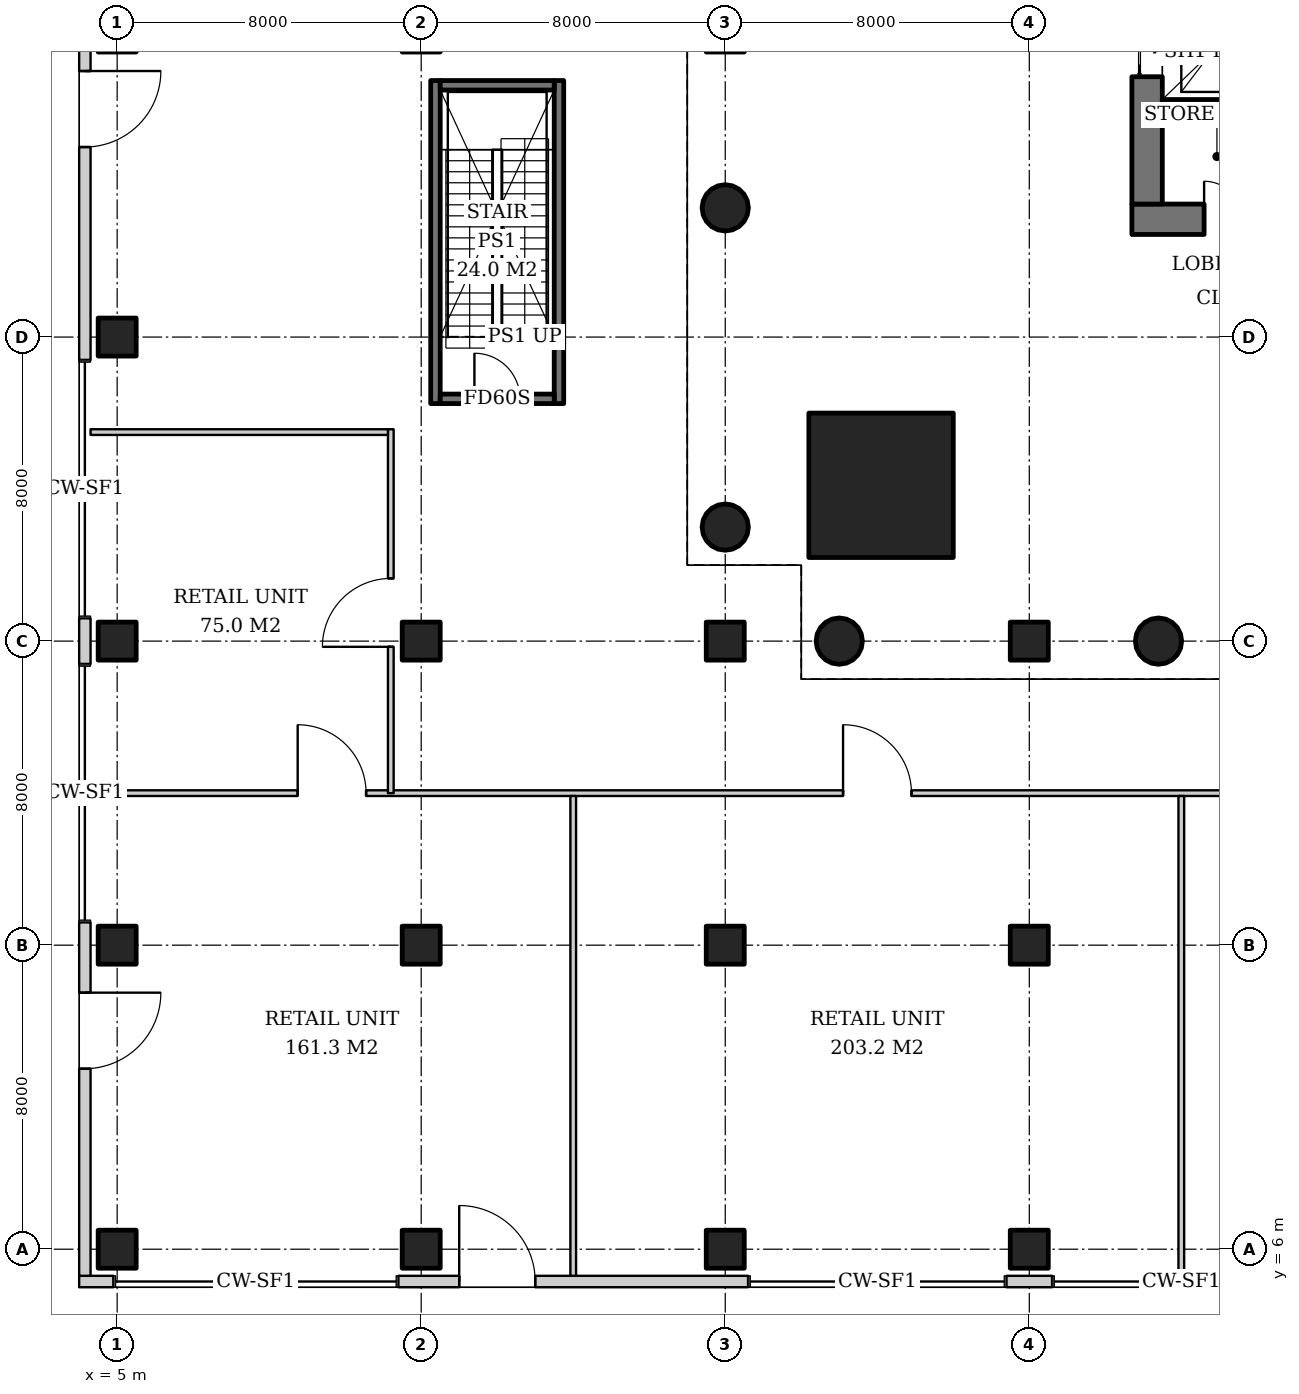
"""IFC4 building model, lengths in metres.
Left out: names, types, materials, properties, quantities, classifications, styles, units other than length and angle.
Written with IfcOpenShell. Run it as: python <this file> out.ifc"""

import sys

from ifc_helpers import new_model, si_unit, direction, frame, frame_2d, origin, origin_2d, place, context, subcontext, project, spatial, rectangle, hollow_circle, extrude, element, fill, save


model = new_model("IFC4")
c1 = context("Model", 3, precision=1e-05, world=origin(), true_north=direction((0.0, 1.0)))
c2 = subcontext(c1, "Body", "Model", "MODEL_VIEW")
j1 = project(units=[si_unit("LENGTHUNIT", "METRE"), si_unit("PLANEANGLEUNIT", "RADIAN")], contexts=[c1])
p1 = place(None, origin())
s1 = spatial("IfcSite", under=j1, at=p1, CompositionType="ELEMENT")
p2 = place(p1, origin())
s2 = spatial("IfcBuilding", under=s1, at=p2, CompositionType="ELEMENT")
p3 = place(p2, origin())
s3 = spatial("IfcBuildingStorey", under=s2, at=p3, CompositionType="ELEMENT", Elevation=0.0)
for number, where, z_axis, x_axis in (
    (1, (5.0, 6.0, 0.0), (0.0, 0.0, 1.0), (1.0, 0.0, 0.0)),
    (2, (5.0, 14.0, 0.0), (0.0, 0.0, 1.0), (1.0, 0.0, 0.0)),
    (3, (5.0, 22.0, 0.0), (0.0, 0.0, 1.0), (1.0, 0.0, 0.0)),
    (4, (5.0, 30.0, 0.0), (0.0, 0.0, 1.0), (1.0, 0.0, 0.0)),
    (5, (13.0, 6.0, 0.0), (0.0, 0.0, 1.0), (1.0, 0.0, 0.0)),
    (6, (13.0, 14.0, 0.0), (0.0, 0.0, 1.0), (1.0, 0.0, 0.0)),
    (7, (13.0, 22.0, 0.0), (0.0, 0.0, 1.0), (1.0, 0.0, 0.0)),
    (8, (21.0, 6.0, 0.0), (0.0, 0.0, 1.0), (1.0, 0.0, 0.0)),
    (9, (21.0, 14.0, 0.0), (0.0, 0.0, 1.0), (1.0, 0.0, 0.0)),
    (10, (29.0, 6.0, 0.0), (0.0, 0.0, 1.0), (1.0, 0.0, 0.0)),
    (11, (29.0, 14.0, 0.0), (0.0, 0.0, 1.0), (1.0, 0.0, 0.0)),
):
    element("IfcColumn", number, at=place(p3, frame(where, z_axis=z_axis, x_axis=x_axis)), inside=s3, PredefinedType="COLUMN", context=c2, shape_type="SweptSolid", body=[
        extrude(rectangle(XDim=1.0, YDim=1.0, at=origin_2d()), origin(), (0.0, 0.0, 1.0), 6.0),
    ])
p4 = place(p3, frame((25.1, 26.1, 0.0), z_axis=(0.0, 0.0, 1.0), x_axis=(1.0, 0.0, 0.0)))
e12 = element("IfcColumn", 12, at=p4, inside=s3, PredefinedType="COLUMN", context=c2, shape_type="SweptSolid", body=[
    extrude(rectangle(XDim=3.8, YDim=3.8, at=origin_2d()), origin(), (0.0, 0.0, 1.0), 6.0),
])
for number, where, z_axis, x_axis in (
    (13, (21.0, 25.0, 0.0), (0.0, 0.0, 1.0), (1.0, 0.0, 0.0)),
    (14, (21.0, 33.4, 0.0), (0.0, 0.0, 1.0), (1.0, 0.0, 0.0)),
    (15, (24.0, 22.0, 0.0), (0.0, 0.0, 1.0), (1.0, 0.0, 0.0)),
    (16, (32.4, 22.0, 0.0), (0.0, 0.0, 1.0), (1.0, 0.0, 0.0)),
):
    element("IfcColumn", number, at=place(p3, frame(where, z_axis=z_axis, x_axis=x_axis)), inside=s3, PredefinedType="COLUMN", context=c2, shape_type="SweptSolid", body=[
        extrude(hollow_circle(Radius=0.61, WallThickness=0.04, at=origin_2d()), origin(), (0.0, 0.0, 1.0), 6.0),
    ])
p5 = place(p3, frame((31.7, 33.1, 0.0), z_axis=(0.0, 0.0, 1.0), x_axis=(1.0, 0.0, 0.0)))
e17 = element("IfcWall", 17, at=p5, inside=s3, PredefinedType="SHEAR", context=c2, shape_type="SweptSolid", body=[
    extrude(rectangle(XDim=26.6, YDim=0.8, at=frame_2d((13.3, 0.0))), origin(), (0.0, 0.0, 1.0), 6.0),
])
p6 = place(p5, frame((7.3, 0.0, 0.0)))
e18 = element("IfcOpeningElement", 18, at=p6, cuts=e17, PredefinedType="OPENING", context=c2, shape_type="SweptSolid", body=[
    extrude(rectangle(XDim=1.0, YDim=2.1, at=frame_2d((0.5, 1.05))), frame((0.0, 0.41, 0.0), z_axis=(0.0, -1.0, 0.0), x_axis=(1.0, 0.0, 0.0)), (0.0, 0.0, 1.0), 0.82),
])
p7 = place(p5, frame((18.75, 0.0, 0.0)))
e19 = element("IfcOpeningElement", 19, at=p7, cuts=e17, PredefinedType="OPENING", context=c2, shape_type="SweptSolid", body=[
    extrude(rectangle(XDim=1.0, YDim=2.1, at=frame_2d((0.5, 1.05))), frame((0.0, 0.41, 0.0), z_axis=(0.0, -1.0, 0.0), x_axis=(1.0, 0.0, 0.0)), (0.0, 0.0, 1.0), 0.82),
])
p8 = place(p5, frame((1.9, 0.0, 0.0)))
e20 = element("IfcOpeningElement", 20, at=p8, cuts=e17, PredefinedType="OPENING", context=c2, shape_type="SweptSolid", body=[
    extrude(rectangle(XDim=1.0, YDim=2.1, at=frame_2d((0.5, 1.05))), frame((0.0, 0.41, 0.0), z_axis=(0.0, -1.0, 0.0), x_axis=(1.0, 0.0, 0.0)), (0.0, 0.0, 1.0), 0.82),
])
p9 = place(p5, frame((4.725, 0.0, 0.0)))
e21 = element("IfcOpeningElement", 21, at=p9, cuts=e17, PredefinedType="OPENING", context=c2, shape_type="SweptSolid", body=[
    extrude(rectangle(XDim=1.0, YDim=2.1, at=frame_2d((0.5, 1.05))), frame((0.0, 0.41, 0.0), z_axis=(0.0, -1.0, 0.0), x_axis=(1.0, 0.0, 0.0)), (0.0, 0.0, 1.0), 0.82),
])
p10 = place(p5, frame((12.44, 0.0, 0.0)))
e22 = element("IfcOpeningElement", 22, at=p10, cuts=e17, PredefinedType="OPENING", context=c2, shape_type="SweptSolid", body=[
    extrude(rectangle(XDim=1.0, YDim=2.1, at=frame_2d((0.5, 1.05))), frame((0.0, 0.41, 0.0), z_axis=(0.0, -1.0, 0.0), x_axis=(1.0, 0.0, 0.0)), (0.0, 0.0, 1.0), 0.82),
])
p11 = place(p5, frame((20.626, 0.0, 0.0)))
e23 = element("IfcOpeningElement", 23, at=p11, cuts=e17, PredefinedType="OPENING", context=c2, shape_type="SweptSolid", body=[
    extrude(rectangle(XDim=1.0, YDim=2.1, at=frame_2d((0.5, 1.05))), frame((0.0, 0.41, 0.0), z_axis=(0.0, -1.0, 0.0), x_axis=(1.0, 0.0, 0.0)), (0.0, 0.0, 1.0), 0.82),
])
p12 = place(p5, frame((23.476, 0.0, 0.0)))
e24 = element("IfcOpeningElement", 24, at=p12, cuts=e17, PredefinedType="OPENING", context=c2, shape_type="SweptSolid", body=[
    extrude(rectangle(XDim=1.0, YDim=2.1, at=frame_2d((0.5, 1.05))), frame((0.0, 0.41, 0.0), z_axis=(0.0, -1.0, 0.0), x_axis=(1.0, 0.0, 0.0)), (0.0, 0.0, 1.0), 0.82),
])
p13 = place(p3, frame((32.1, 33.5, 0.0), z_axis=(0.0, 0.0, 1.0), x_axis=(0.0, 1.0, 0.0)))
e25 = element("IfcWall", 25, at=p13, inside=s3, PredefinedType="SHEAR", context=c2, shape_type="SweptSolid", body=[
    extrude(rectangle(XDim=25.0, YDim=0.8, at=frame_2d((12.5, 0.0))), origin(), (0.0, 0.0, 1.0), 6.0),
])
p14 = place(p13, frame((3.35, 0.0, 0.0)))
e26 = element("IfcOpeningElement", 26, at=p14, cuts=e25, PredefinedType="OPENING", context=c2, shape_type="SweptSolid", body=[
    extrude(rectangle(XDim=1.3, YDim=2.2, at=frame_2d((0.65, 1.1))), frame((0.0, 0.41, 0.0), z_axis=(0.0, -1.0, 0.0), x_axis=(1.0, 0.0, 0.0)), (0.0, 0.0, 1.0), 0.82),
])
p15 = place(p13, frame((6.1, 0.0, 0.0)))
e27 = element("IfcOpeningElement", 27, at=p15, cuts=e25, PredefinedType="OPENING", context=c2, shape_type="SweptSolid", body=[
    extrude(rectangle(XDim=1.3, YDim=2.2, at=frame_2d((0.65, 1.1))), frame((0.0, 0.41, 0.0), z_axis=(0.0, -1.0, 0.0), x_axis=(1.0, 0.0, 0.0)), (0.0, 0.0, 1.0), 0.82),
])
p16 = place(p13, frame((8.85, 0.0, 0.0)))
e28 = element("IfcOpeningElement", 28, at=p16, cuts=e25, PredefinedType="OPENING", context=c2, shape_type="SweptSolid", body=[
    extrude(rectangle(XDim=1.3, YDim=2.2, at=frame_2d((0.65, 1.1))), frame((0.0, 0.41, 0.0), z_axis=(0.0, -1.0, 0.0), x_axis=(1.0, 0.0, 0.0)), (0.0, 0.0, 1.0), 0.82),
])
p17 = place(p13, frame((14.85, 0.0, 0.0)))
e29 = element("IfcOpeningElement", 29, at=p17, cuts=e25, PredefinedType="OPENING", context=c2, shape_type="SweptSolid", body=[
    extrude(rectangle(XDim=1.3, YDim=2.2, at=frame_2d((0.65, 1.1))), frame((0.0, 0.41, 0.0), z_axis=(0.0, -1.0, 0.0), x_axis=(1.0, 0.0, 0.0)), (0.0, 0.0, 1.0), 0.82),
])
p18 = place(p13, frame((17.6, 0.0, 0.0)))
e30 = element("IfcOpeningElement", 30, at=p18, cuts=e25, PredefinedType="OPENING", context=c2, shape_type="SweptSolid", body=[
    extrude(rectangle(XDim=1.3, YDim=2.2, at=frame_2d((0.65, 1.1))), frame((0.0, 0.41, 0.0), z_axis=(0.0, -1.0, 0.0), x_axis=(1.0, 0.0, 0.0)), (0.0, 0.0, 1.0), 0.82),
])
p19 = place(p13, frame((11.6, 0.0, 0.0)))
e31 = element("IfcOpeningElement", 31, at=p19, cuts=e25, PredefinedType="OPENING", context=c2, shape_type="SweptSolid", body=[
    extrude(rectangle(XDim=1.8, YDim=2.4, at=frame_2d((0.9, 1.2))), frame((0.0, 0.41, 0.0), z_axis=(0.0, -1.0, 0.0), x_axis=(1.0, 0.0, 0.0)), (0.0, 0.0, 1.0), 0.82),
])
for number, where, z_axis, x_axis in (
    (32, (21.0, 22.0, 0.0), (0.0, 0.0, 1.0), (1.0, 0.0, 0.0)),
    (33, (29.0, 22.0, 0.0), (0.0, 0.0, 1.0), (1.0, 0.0, 0.0)),
):
    element("IfcColumn", number, at=place(p3, frame(where, z_axis=z_axis, x_axis=x_axis)), inside=s3, PredefinedType="COLUMN", context=c2, shape_type="SweptSolid", body=[
        extrude(rectangle(XDim=1.0, YDim=1.0, at=origin_2d()), origin(), (0.0, 0.0, 1.0), 6.0),
    ])
p20 = place(p3, frame((4.0, 5.15, 0.0), z_axis=(0.0, 0.0, 1.0), x_axis=(1.0, 0.0, 0.0)))
e34 = element("IfcWall", 34, at=p20, inside=s3, PredefinedType="SOLIDWALL", context=c2, shape_type="SweptSolid", body=[
    extrude(rectangle(XDim=0.9, YDim=0.3, at=frame_2d((0.45, 0.0))), origin(), (0.0, 0.0, 1.0), 5.7),
])
p21 = place(p3, frame((12.4, 5.15, 0.0), z_axis=(0.0, 0.0, 1.0), x_axis=(1.0, 0.0, 0.0)))
e35 = element("IfcWall", 35, at=p21, inside=s3, PredefinedType="SOLIDWALL", context=c2, shape_type="SweptSolid", body=[
    extrude(rectangle(XDim=9.2, YDim=0.3, at=frame_2d((4.6, 0.0))), origin(), (0.0, 0.0, 1.0), 5.7),
])
p22 = place(p21, frame((1.6, 0.0, 0.0)))
e36 = element("IfcOpeningElement", 36, at=p22, cuts=e35, PredefinedType="OPENING", context=c2, shape_type="SweptSolid", body=[
    extrude(rectangle(XDim=2.0, YDim=2.7, at=frame_2d((1.0, 1.35))), frame((0.0, 0.16, 0.0), z_axis=(0.0, -1.0, 0.0), x_axis=(1.0, 0.0, 0.0)), (0.0, 0.0, 1.0), 0.32),
])
p23 = place(p3, frame((28.4, 5.15, 0.0), z_axis=(0.0, 0.0, 1.0), x_axis=(1.0, 0.0, 0.0)))
e37 = element("IfcWall", 37, at=p23, inside=s3, PredefinedType="SOLIDWALL", context=c2, shape_type="SweptSolid", body=[
    extrude(rectangle(XDim=1.2, YDim=0.3, at=frame_2d((0.6, 0.0))), origin(), (0.0, 0.0, 1.0), 5.7),
])
p24 = place(p3, frame((4.15, 38.6, 0.0), z_axis=(0.0, 0.0, 1.0), x_axis=(0.0, -1.0, 0.0)))
e38 = element("IfcWall", 38, at=p24, inside=s3, PredefinedType="SOLIDWALL", context=c2, shape_type="SweptSolid", body=[
    extrude(rectangle(XDim=9.2, YDim=0.3, at=frame_2d((4.6, 0.0))), origin(), (0.0, 0.0, 1.0), 5.7),
])
p25 = place(p24, frame((1.6, 0.0, 0.0)))
e39 = element("IfcOpeningElement", 39, at=p25, cuts=e38, PredefinedType="OPENING", context=c2, shape_type="SweptSolid", body=[
    extrude(rectangle(XDim=2.0, YDim=2.7, at=frame_2d((1.0, 1.35))), frame((0.0, 0.16, 0.0), z_axis=(0.0, -1.0, 0.0), x_axis=(1.0, 0.0, 0.0)), (0.0, 0.0, 1.0), 0.32),
])
p26 = place(p3, frame((4.15, 22.6, 0.0), z_axis=(0.0, 0.0, 1.0), x_axis=(0.0, -1.0, 0.0)))
e40 = element("IfcWall", 40, at=p26, inside=s3, PredefinedType="SOLIDWALL", context=c2, shape_type="SweptSolid", body=[
    extrude(rectangle(XDim=1.2, YDim=0.3, at=frame_2d((0.6, 0.0))), origin(), (0.0, 0.0, 1.0), 5.7),
])
p27 = place(p3, frame((4.15, 14.6, 0.0), z_axis=(0.0, 0.0, 1.0), x_axis=(0.0, -1.0, 0.0)))
e41 = element("IfcWall", 41, at=p27, inside=s3, PredefinedType="SOLIDWALL", context=c2, shape_type="SweptSolid", body=[
    extrude(rectangle(XDim=9.3, YDim=0.3, at=frame_2d((4.65, 0.0))), origin(), (0.0, 0.0, 1.0), 5.7),
])
p28 = place(p27, frame((1.85, 0.0, 0.0)))
e42 = element("IfcOpeningElement", 42, at=p28, cuts=e41, PredefinedType="OPENING", context=c2, shape_type="SweptSolid", body=[
    extrude(rectangle(XDim=2.0, YDim=2.7, at=frame_2d((1.0, 1.35))), frame((0.0, 0.16, 0.0), z_axis=(0.0, -1.0, 0.0), x_axis=(1.0, 0.0, 0.0)), (0.0, 0.0, 1.0), 0.32),
])
p29 = place(p3, frame((32.5, 36.125, 0.0), z_axis=(0.0, 0.0, 1.0), x_axis=(1.0, 0.0, 0.0)))
e43 = element("IfcWall", 43, at=p29, inside=s3, PredefinedType="SHEAR", context=c2, shape_type="SweptSolid", body=[
    extrude(rectangle(XDim=2.6, YDim=0.25, at=frame_2d((1.3, 0.0))), origin(), (0.0, 0.0, 1.0), 6.0),
])
for number, where, z_axis, x_axis in (
    (44, (13.375, 28.25, 0.0), (0.0, 0.0, 1.0), (0.0, 1.0, 0.0)),
    (45, (16.625, 28.25, 0.0), (0.0, 0.0, 1.0), (0.0, 1.0, 0.0)),
):
    element("IfcWall", number, at=place(p3, frame(where, z_axis=z_axis, x_axis=x_axis)), inside=s3, PredefinedType="SOLIDWALL", context=c2, shape_type="SweptSolid", body=[
        extrude(rectangle(XDim=8.5, YDim=0.25, at=frame_2d((4.25, 0.0))), origin(), (0.0, 0.0, 1.0), 5.7),
    ])
p30 = place(p3, frame((13.5, 28.375, 0.0), z_axis=(0.0, 0.0, 1.0), x_axis=(1.0, 0.0, 0.0)))
e46 = element("IfcWall", 46, at=p30, inside=s3, PredefinedType="SOLIDWALL", context=c2, shape_type="SweptSolid", body=[
    extrude(rectangle(XDim=3.0, YDim=0.25, at=frame_2d((1.5, 0.0))), origin(), (0.0, 0.0, 1.0), 5.7),
])
p31 = place(p30, frame((0.9, 0.0, 0.0)))
e47 = element("IfcOpeningElement", 47, at=p31, cuts=e46, PredefinedType="OPENING", context=c2, shape_type="SweptSolid", body=[
    extrude(rectangle(XDim=1.2, YDim=2.1, at=frame_2d((0.6, 1.05))), frame((0.0, 0.135, 0.0), z_axis=(0.0, -1.0, 0.0), x_axis=(1.0, 0.0, 0.0)), (0.0, 0.0, 1.0), 0.27),
])
p32 = place(p3, frame((13.5, 36.625, 0.0), z_axis=(0.0, 0.0, 1.0), x_axis=(1.0, 0.0, 0.0)))
e48 = element("IfcWall", 48, at=p32, inside=s3, PredefinedType="SOLIDWALL", context=c2, shape_type="SweptSolid", body=[
    extrude(rectangle(XDim=3.0, YDim=0.25, at=frame_2d((1.5, 0.0))), origin(), (0.0, 0.0, 1.0), 5.7),
])
p33 = place(p3, frame((4.3, 18.0, 0.0), z_axis=(0.0, 0.0, 1.0), x_axis=(1.0, 0.0, 0.0)))
e49 = element("IfcWall", 49, at=p33, inside=s3, PredefinedType="PARTITIONING", context=c2, shape_type="SweptSolid", body=[
    extrude(rectangle(XDim=60.775, YDim=0.15, at=frame_2d((30.387, 0.0))), origin(), (0.0, 0.0, 1.0), 4.2),
])
p34 = place(p33, frame((5.45, 0.0, 0.0)))
e50 = element("IfcOpeningElement", 50, at=p34, cuts=e49, PredefinedType="OPENING", context=c2, shape_type="SweptSolid", body=[
    extrude(rectangle(XDim=1.8, YDim=2.4, at=frame_2d((0.9, 1.2))), frame((0.0, 0.085, 0.0), z_axis=(0.0, -1.0, 0.0), x_axis=(1.0, 0.0, 0.0)), (0.0, 0.0, 1.0), 0.17),
])
p35 = place(p33, frame((19.8, 0.0, 0.0)))
e51 = element("IfcOpeningElement", 51, at=p35, cuts=e49, PredefinedType="OPENING", context=c2, shape_type="SweptSolid", body=[
    extrude(rectangle(XDim=1.8, YDim=2.4, at=frame_2d((0.9, 1.2))), frame((0.0, 0.085, 0.0), z_axis=(0.0, -1.0, 0.0), x_axis=(1.0, 0.0, 0.0)), (0.0, 0.0, 1.0), 0.17),
])
p36 = place(p33, frame((35.8, 0.0, 0.0)))
e52 = element("IfcOpeningElement", 52, at=p36, cuts=e49, PredefinedType="OPENING", context=c2, shape_type="SweptSolid", body=[
    extrude(rectangle(XDim=1.8, YDim=2.4, at=frame_2d((0.9, 1.2))), frame((0.0, 0.085, 0.0), z_axis=(0.0, -1.0, 0.0), x_axis=(1.0, 0.0, 0.0)), (0.0, 0.0, 1.0), 0.17),
])
p37 = place(p33, frame((51.8, 0.0, 0.0)))
e53 = element("IfcOpeningElement", 53, at=p37, cuts=e49, PredefinedType="OPENING", context=c2, shape_type="SweptSolid", body=[
    extrude(rectangle(XDim=1.8, YDim=2.4, at=frame_2d((0.9, 1.2))), frame((0.0, 0.085, 0.0), z_axis=(0.0, -1.0, 0.0), x_axis=(1.0, 0.0, 0.0)), (0.0, 0.0, 1.0), 0.17),
])
for number, where, z_axis, x_axis in (
    (54, (17.0, 17.925, 0.0), (0.0, 0.0, 1.0), (0.0, -1.0, 0.0)),
    (55, (33.0, 17.925, 0.0), (0.0, 0.0, 1.0), (0.0, -1.0, 0.0)),
):
    element("IfcWall", number, at=place(p3, frame(where, z_axis=z_axis, x_axis=x_axis)), inside=s3, PredefinedType="PARTITIONING", context=c2, shape_type="SweptSolid", body=[
        extrude(rectangle(XDim=12.625, YDim=0.15, at=frame_2d((6.312, 0.0))), origin(), (0.0, 0.0, 1.0), 4.2),
    ])
p38 = place(p3, frame((12.2, 18.0, 0.0), z_axis=(0.0, 0.0, 1.0), x_axis=(0.0, 1.0, 0.0)))
e56 = element("IfcWall", 56, at=p38, inside=s3, PredefinedType="PARTITIONING", context=c2, shape_type="SweptSolid", body=[
    extrude(rectangle(XDim=9.575, YDim=0.15, at=frame_2d((4.788, 0.0))), origin(), (0.0, 0.0, 1.0), 4.2),
])
p39 = place(p38, frame((3.85, 0.0, 0.0)))
e57 = element("IfcOpeningElement", 57, at=p39, cuts=e56, PredefinedType="OPENING", context=c2, shape_type="SweptSolid", body=[
    extrude(rectangle(XDim=1.8, YDim=2.4, at=frame_2d((0.9, 1.2))), frame((0.0, 0.085, 0.0), z_axis=(0.0, -1.0, 0.0), x_axis=(1.0, 0.0, 0.0)), (0.0, 0.0, 1.0), 0.17),
])
p40 = place(p3, frame((4.3, 27.5, 0.0), z_axis=(0.0, 0.0, 1.0), x_axis=(1.0, 0.0, 0.0)))
e58 = element("IfcWall", 58, at=p40, inside=s3, PredefinedType="PARTITIONING", context=c2, shape_type="SweptSolid", body=[
    extrude(rectangle(XDim=7.825, YDim=0.15, at=frame_2d((3.913, 0.0))), origin(), (0.0, 0.0, 1.0), 4.2),
])
p41 = place(p22, origin())
e59 = element("IfcDoor", 59, at=p41, inside=s3, OperationType="DOUBLE_DOOR_SINGLE_SWING", PredefinedType="DOOR", context=c2, shape_type="SweptSolid", body=[
    extrude(rectangle(XDim=2.0, YDim=2.7, at=frame_2d((1.0, 1.35))), frame((0.0, 0.025, 0.0), z_axis=(0.0, -1.0, 0.0), x_axis=(1.0, 0.0, 0.0)), (0.0, 0.0, 1.0), 0.05),
])
fill(e36, e59)
p42 = place(p25, origin())
e60 = element("IfcDoor", 60, at=p42, inside=s3, OperationType="DOUBLE_DOOR_SINGLE_SWING", PredefinedType="DOOR", context=c2, shape_type="SweptSolid", body=[
    extrude(rectangle(XDim=2.0, YDim=2.7, at=frame_2d((1.0, 1.35))), frame((0.0, 0.025, 0.0), z_axis=(0.0, -1.0, 0.0), x_axis=(1.0, 0.0, 0.0)), (0.0, 0.0, 1.0), 0.05),
])
fill(e39, e60)
p43 = place(p28, origin())
e61 = element("IfcDoor", 61, at=p43, inside=s3, OperationType="DOUBLE_DOOR_SINGLE_SWING", PredefinedType="DOOR", context=c2, shape_type="SweptSolid", body=[
    extrude(rectangle(XDim=2.0, YDim=2.7, at=frame_2d((1.0, 1.35))), frame((0.0, 0.025, 0.0), z_axis=(0.0, -1.0, 0.0), x_axis=(1.0, 0.0, 0.0)), (0.0, 0.0, 1.0), 0.05),
])
fill(e42, e61)
p44 = place(p14, origin())
e62 = element("IfcDoor", 62, at=p44, inside=s3, OperationType="DOUBLE_DOOR_SLIDING", PredefinedType="DOOR", context=c2, shape_type="SweptSolid", body=[
    extrude(rectangle(XDim=1.3, YDim=2.2, at=frame_2d((0.65, 1.1))), frame((0.0, 0.025, 0.0), z_axis=(0.0, -1.0, 0.0), x_axis=(1.0, 0.0, 0.0)), (0.0, 0.0, 1.0), 0.05),
])
fill(e26, e62)
p45 = place(p8, origin())
e63 = element("IfcDoor", 63, at=p45, inside=s3, OperationType="SINGLE_SWING_LEFT", PredefinedType="DOOR", context=c2, shape_type="SweptSolid", body=[
    extrude(rectangle(XDim=1.0, YDim=2.1, at=frame_2d((0.5, 1.05))), frame((0.0, 0.39, 0.0), z_axis=(0.0, -1.0, 0.0), x_axis=(1.0, 0.0, 0.0)), (0.0, 0.0, 1.0), 0.05),
])
fill(e20, e63)
p46 = place(p31, origin())
e64 = element("IfcDoor", 64, at=p46, inside=s3, OperationType="SINGLE_SWING_LEFT", PredefinedType="DOOR", context=c2, shape_type="SweptSolid", body=[
    extrude(rectangle(XDim=1.2, YDim=2.1, at=frame_2d((0.6, 1.05))), frame((0.0, 0.025, 0.0), z_axis=(0.0, -1.0, 0.0), x_axis=(1.0, 0.0, 0.0)), (0.0, 0.0, 1.0), 0.05),
])
fill(e47, e64)
p47 = place(p34, origin())
e65 = element("IfcDoor", 65, at=p47, inside=s3, OperationType="DOUBLE_DOOR_SINGLE_SWING", PredefinedType="DOOR", context=c2, shape_type="SweptSolid", body=[
    extrude(rectangle(XDim=1.8, YDim=2.4, at=frame_2d((0.9, 1.2))), frame((0.0, 0.025, 0.0), z_axis=(0.0, -1.0, 0.0), x_axis=(1.0, 0.0, 0.0)), (0.0, 0.0, 1.0), 0.05),
])
fill(e50, e65)
p48 = place(p35, origin())
e66 = element("IfcDoor", 66, at=p48, inside=s3, OperationType="DOUBLE_DOOR_SINGLE_SWING", PredefinedType="DOOR", context=c2, shape_type="SweptSolid", body=[
    extrude(rectangle(XDim=1.8, YDim=2.4, at=frame_2d((0.9, 1.2))), frame((0.0, 0.025, 0.0), z_axis=(0.0, -1.0, 0.0), x_axis=(1.0, 0.0, 0.0)), (0.0, 0.0, 1.0), 0.05),
])
fill(e51, e66)
p49 = place(p39, origin())
e67 = element("IfcDoor", 67, at=p49, inside=s3, OperationType="DOUBLE_DOOR_SINGLE_SWING", PredefinedType="DOOR", context=c2, shape_type="SweptSolid", body=[
    extrude(rectangle(XDim=1.8, YDim=2.4, at=frame_2d((0.9, 1.2))), frame((0.0, 0.025, 0.0), z_axis=(0.0, -1.0, 0.0), x_axis=(1.0, 0.0, 0.0)), (0.0, 0.0, 1.0), 0.05),
])
fill(e57, e67)
save(model, sys.argv[1])
